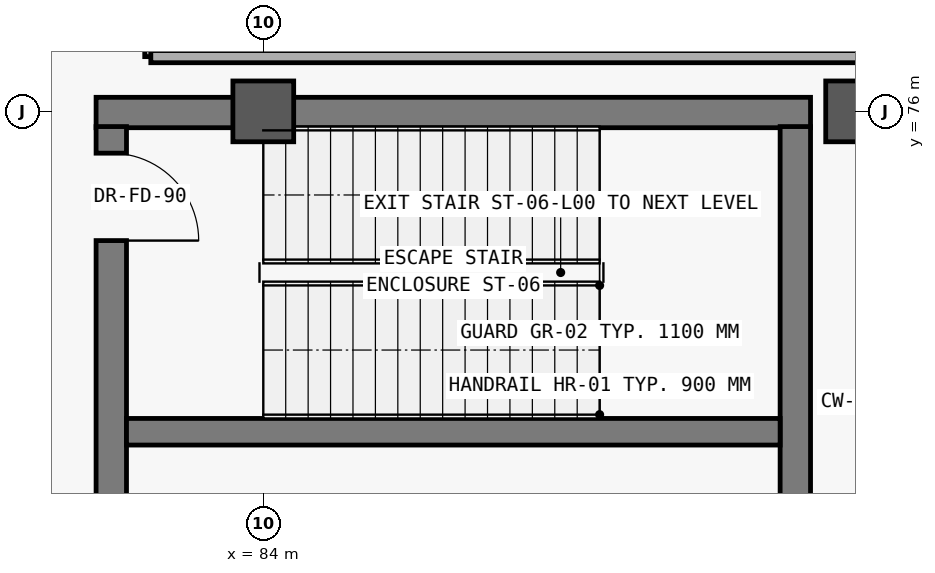
"""IFC4 building model, lengths in metres.
Left out: names, types, materials, properties, quantities, classifications, styles, units other than length and angle.
Written with IfcOpenShell. Run it as: python <this file> out.ifc"""

import sys

from ifc_helpers import new_model, si_unit, direction, frame, frame_2d, origin, origin_2d, place, context, subcontext, project, spatial, rectangle, extrude, element, fill, save


model = new_model("IFC4")
c1 = context("Model", 3, precision=1e-05, world=origin(), true_north=direction((0.0, 1.0)))
c2 = subcontext(c1, "Body", "Model", "MODEL_VIEW")
j1 = project(units=[si_unit("LENGTHUNIT", "METRE"), si_unit("PLANEANGLEUNIT", "RADIAN")], contexts=[c1])
p1 = place(None, origin())
s1 = spatial("IfcSite", under=j1, at=p1, CompositionType="ELEMENT")
p2 = place(p1, origin())
s2 = spatial("IfcBuilding", under=s1, at=p2, CompositionType="ELEMENT")
p3 = place(p2, origin())
s3 = spatial("IfcBuildingStorey", under=s2, at=p3, CompositionType="ELEMENT", Elevation=0.0)
for number, where, z_axis, x_axis in (
    (1, (84.0, 76.0, 0.0), (0.0, 0.0, 1.0), (1.0, 0.0, 0.0)),
    (2, (91.8, 76.0, 0.0), (0.0, 0.0, 1.0), (1.0, 0.0, 0.0)),
):
    element("IfcColumn", number, at=place(p3, frame(where, z_axis=z_axis, x_axis=x_axis)), inside=s3, PredefinedType="COLUMN", context=c2, shape_type="SweptSolid", body=[
        extrude(rectangle(XDim=0.8, YDim=0.8, at=origin_2d()), origin(), (0.0, 0.0, 1.0), 5.4),
    ])
p4 = place(p3, frame((91.2, 75.985, 0.0), z_axis=(0.0, 0.0, 1.0), x_axis=(-1.0, 0.0, 0.0)))
e3 = element("IfcWall", 3, at=p4, inside=s3, PredefinedType="SHEAR", context=c2, shape_type="SweptSolid", body=[
    extrude(rectangle(XDim=9.4, YDim=0.4, at=frame_2d((4.7, 0.0))), origin(), (0.0, 0.0, 1.0), 5.08),
])
p5 = place(p3, frame((82.0, 75.8, 0.0), z_axis=(0.0, 0.0, 1.0), x_axis=(0.0, -1.0, 0.0)))
e4 = element("IfcWall", 4, at=p5, inside=s3, PredefinedType="SHEAR", context=c2, shape_type="SweptSolid", body=[
    extrude(rectangle(XDim=7.0, YDim=0.4, at=frame_2d((3.5, 0.0))), origin(), (0.0, 0.0, 1.0), 5.08),
])
p6 = place(p5, frame((0.35, 0.0, 0.0)))
e5 = element("IfcOpeningElement", 5, at=p6, cuts=e4, PredefinedType="OPENING", context=c2, shape_type="SweptSolid", body=[
    extrude(rectangle(XDim=1.15, YDim=2.2, at=frame_2d((0.575, 1.1))), frame((0.0, 0.21, 0.0), z_axis=(0.0, -1.0, 0.0), x_axis=(1.0, 0.0, 0.0)), (0.0, 0.0, 1.0), 0.42),
])
p7 = place(p3, frame((91.0, 68.8, 0.0), z_axis=(0.0, 0.0, 1.0), x_axis=(0.0, 1.0, 0.0)))
e6 = element("IfcWall", 6, at=p7, inside=s3, PredefinedType="SHEAR", context=c2, shape_type="SweptSolid", body=[
    extrude(rectangle(XDim=7.0, YDim=0.4, at=frame_2d((3.5, 0.0))), origin(), (0.0, 0.0, 1.0), 5.08),
])
p8 = place(p3, frame((82.2, 71.785, 0.0), z_axis=(0.0, 0.0, 1.0), x_axis=(1.0, 0.0, 0.0)))
e7 = element("IfcWall", 7, at=p8, inside=s3, PredefinedType="SHEAR", context=c2, shape_type="SweptSolid", body=[
    extrude(rectangle(XDim=8.6, YDim=0.35, at=frame_2d((4.3, 0.0))), origin(), (0.0, 0.0, 1.0), 5.08),
])
p9 = place(p3, frame((82.52, 76.72, 0.0), z_axis=(0.0, 0.0, 1.0), x_axis=(0.0, 1.0, 0.0)))
e8 = element("IfcWall", 8, at=p9, inside=s3, PredefinedType="PARTITIONING", context=c2, shape_type="SweptSolid", body=[
    extrude(rectangle(XDim=7.76, YDim=0.16, at=frame_2d((3.88, 0.0))), origin(), (0.0, 0.0, 1.0), 4.18),
])
p10 = place(p9, frame((2.906, 0.0, 0.0)))
e9 = element("IfcOpeningElement", 9, at=p10, cuts=e8, PredefinedType="OPENING", context=c2, shape_type="SweptSolid", body=[
    extrude(rectangle(XDim=1.06, YDim=2.2, at=frame_2d((0.53, 1.1))), frame((0.0, 0.09, 0.0), z_axis=(0.0, -1.0, 0.0), x_axis=(1.0, 0.0, 0.0)), (0.0, 0.0, 1.0), 0.18),
])
p11 = place(p3, frame((82.52, 76.72, 0.0), z_axis=(0.0, 0.0, 1.0), x_axis=(1.0, 0.0, 0.0)))
e10 = element("IfcWall", 10, at=p11, inside=s3, PredefinedType="PARTITIONING", context=c2, shape_type="SweptSolid", body=[
    extrude(rectangle(XDim=9.64, YDim=0.16, at=frame_2d((4.82, 0.0))), origin(), (0.0, 0.0, 1.0), 4.18),
])
p12 = place(p6, origin())
e11 = element("IfcDoor", 11, at=p12, inside=s3, OperationType="SINGLE_SWING_RIGHT", PredefinedType="DOOR", context=c2, shape_type="SweptSolid", body=[
    extrude(rectangle(XDim=1.15, YDim=2.2, at=frame_2d((0.575, 1.1))), frame((0.0, 0.025, 0.0), z_axis=(0.0, -1.0, 0.0), x_axis=(1.0, 0.0, 0.0)), (0.0, 0.0, 1.0), 0.05),
])
fill(e5, e11)
save(model, sys.argv[1])
